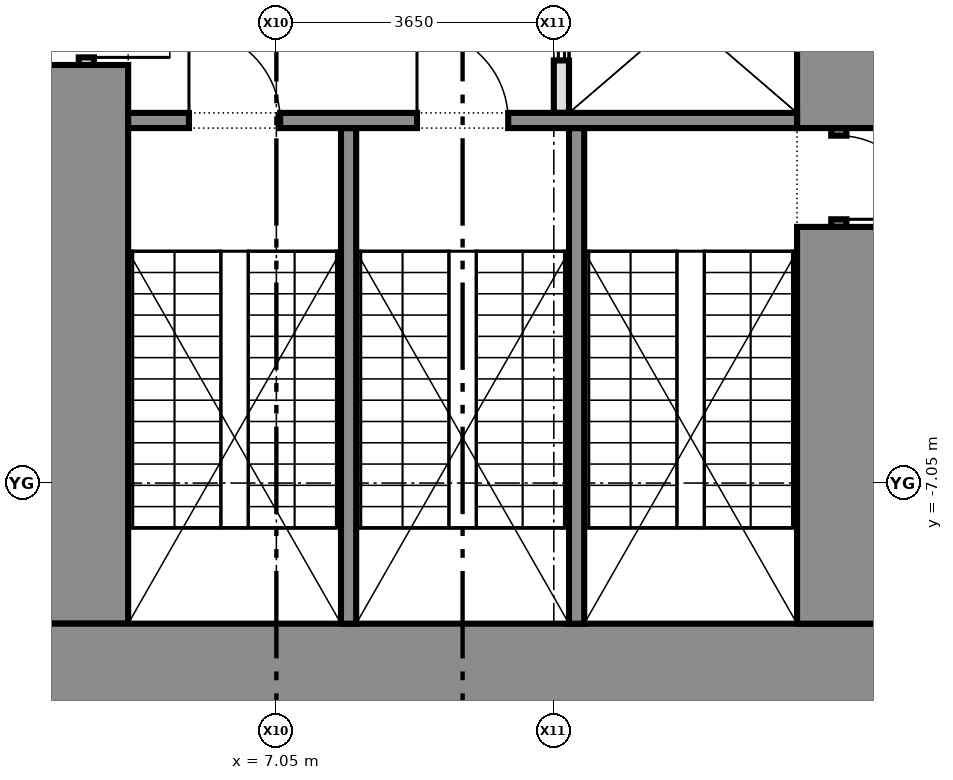
"""IFC4 building model, lengths in metres.
Left out: names, types, materials, properties, quantities, classifications, styles, units other than length and angle.
Written with IfcOpenShell. Run it as: python <this file> out.ifc"""

import sys

from ifc_helpers import new_model, si_unit, direction, frame, frame_2d, origin, place, context, subcontext, project, spatial, rectangle, extrude, element, fill, save


model = new_model("IFC4")
c1 = context("Model", 3, precision=1e-05, world=origin(), true_north=direction((0.0, 1.0)))
c2 = subcontext(c1, "Body", "Model", "MODEL_VIEW")
j1 = project(units=[si_unit("LENGTHUNIT", "METRE"), si_unit("PLANEANGLEUNIT", "RADIAN")], contexts=[c1])
p1 = place(None, origin())
s1 = spatial("IfcSite", under=j1, at=p1, CompositionType="ELEMENT")
p2 = place(p1, origin())
s2 = spatial("IfcBuilding", under=s1, at=p2, CompositionType="ELEMENT")
p3 = place(p2, frame((0.0, 0.0, 40.1)))
s3 = spatial("IfcBuildingStorey", under=s2, at=p3, CompositionType="ELEMENT", Elevation=40.1)
p4 = place(p3, frame((15.0, -9.45, 0.0), z_axis=(0.0, 0.0, 1.0), x_axis=(-1.0, 0.0, 0.0)))
e1 = element("IfcWall", 1, at=p4, inside=s3, PredefinedType="SHEAR", context=c2, shape_type="SweptSolid", body=[
    extrude(rectangle(XDim=11.0, YDim=1.1, at=frame_2d((5.5, 0.0))), origin(), (0.0, 0.0, 1.0), 4.575),
])
p5 = place(p3, frame((14.45, 3.75, 0.0), z_axis=(0.0, 0.0, 1.0), x_axis=(0.0, -1.0, 0.0)))
e2 = element("IfcWall", 2, at=p5, inside=s3, PredefinedType="SHEAR", context=c2, shape_type="SweptSolid", body=[
    extrude(rectangle(XDim=6.13, YDim=1.1, at=frame_2d((3.065, 0.0))), origin(), (0.0, 0.0, 1.0), 4.575),
])
p6 = place(p3, frame((14.45, -2.38, 0.0), z_axis=(0.0, 0.0, 1.0), x_axis=(0.0, -1.0, 0.0)))
e3 = element("IfcWall", 3, at=p6, inside=s3, PredefinedType="SHEAR", context=c2, shape_type="SweptSolid", body=[
    extrude(rectangle(XDim=1.3, YDim=0.2, at=frame_2d((0.65, 0.0))), origin(), (0.0, 0.0, 1.0), 2.4),
])
p7 = place(p6, frame((0.1, 0.0, 0.0)))
e4 = element("IfcOpeningElement", 4, at=p7, cuts=e3, PredefinedType="OPENING", context=c2, shape_type="SweptSolid", body=[
    extrude(rectangle(XDim=1.1, YDim=2.1, at=frame_2d((0.55, 1.05))), frame((0.0, 0.11, 0.0), z_axis=(0.0, -1.0, 0.0), x_axis=(1.0, 0.0, 0.0)), (0.0, 0.0, 1.0), 0.22),
])
p8 = place(p3, frame((14.45, -3.68, 0.0), z_axis=(0.0, 0.0, 1.0), x_axis=(0.0, -1.0, 0.0)))
e5 = element("IfcWall", 5, at=p8, inside=s3, PredefinedType="SHEAR", context=c2, shape_type="SweptSolid", body=[
    extrude(rectangle(XDim=5.22, YDim=1.1, at=frame_2d((2.61, 0.0))), origin(), (0.0, 0.0, 1.0), 4.575),
])
p9 = place(p3, frame((4.55, -0.25, 0.0), z_axis=(0.0, 0.0, 1.0), x_axis=(0.0, -1.0, 0.0)))
e6 = element("IfcWall", 6, at=p9, inside=s3, PredefinedType="PARTITIONING", context=c2, shape_type="SweptSolid", body=[
    extrude(rectangle(XDim=1.3, YDim=0.2, at=frame_2d((0.65, 0.0))), origin(), (0.0, 0.0, 1.0), 2.4),
])
p10 = place(p9, frame((0.1, 0.0, 0.0)))
e7 = element("IfcOpeningElement", 7, at=p10, cuts=e6, PredefinedType="OPENING", context=c2, shape_type="SweptSolid", body=[
    extrude(rectangle(XDim=1.1, YDim=2.1, at=frame_2d((0.55, 1.05))), frame((0.0, 0.11, 0.0), z_axis=(0.0, -1.0, 0.0), x_axis=(1.0, 0.0, 0.0)), (0.0, 0.0, 1.0), 0.22),
])
p11 = place(p3, frame((4.55, -1.55, 0.0), z_axis=(0.0, 0.0, 1.0), x_axis=(0.0, -1.0, 0.0)))
e8 = element("IfcWall", 8, at=p11, inside=s3, PredefinedType="SHEAR", context=c2, shape_type="SweptSolid", body=[
    extrude(rectangle(XDim=7.35, YDim=1.1, at=frame_2d((3.675, 0.0))), origin(), (0.0, 0.0, 1.0), 4.575),
])
p12 = place(p3, frame((10.8, 0.4, 0.0), z_axis=(0.0, 0.0, 1.0), x_axis=(0.0, -1.0, 0.0)))
e9 = element("IfcWall", 9, at=p12, inside=s3, PredefinedType="PARTITIONING", context=c2, shape_type="SweptSolid", body=[
    extrude(rectangle(XDim=2.58, YDim=0.2, at=frame_2d((1.29, 0.0))), origin(), (0.0, 0.0, 1.0), 4.575),
])
p13 = place(p12, frame((0.69, 0.0, 0.0)))
e10 = element("IfcOpeningElement", 10, at=p13, cuts=e9, PredefinedType="OPENING", context=c2, shape_type="SweptSolid", body=[
    extrude(rectangle(XDim=1.2, YDim=2.1, at=frame_2d((0.6, 1.05))), frame((0.0, 0.11, 0.0), z_axis=(0.0, -1.0, 0.0), x_axis=(1.0, 0.0, 0.0)), (0.0, 0.0, 1.0), 0.22),
])
p14 = place(p3, frame((13.9, -2.28, 0.0), z_axis=(0.0, 0.0, 1.0), x_axis=(-1.0, 0.0, 0.0)))
e11 = element("IfcWall", 11, at=p14, inside=s3, PredefinedType="SHEAR", context=c2, shape_type="SweptSolid", body=[
    extrude(rectangle(XDim=8.8, YDim=0.2, at=frame_2d((4.4, 0.0))), origin(), (0.0, 0.0, 1.0), 4.575),
])
p15 = place(p14, frame((3.8, 0.0, 0.0)))
e12 = element("IfcOpeningElement", 12, at=p15, cuts=e11, PredefinedType="OPENING", context=c2, shape_type="SweptSolid", body=[
    extrude(rectangle(XDim=1.2, YDim=2.1, at=frame_2d((0.6, 1.05))), frame((0.0, 0.11, 0.0), z_axis=(0.0, -1.0, 0.0), x_axis=(1.0, 0.0, 0.0)), (0.0, 0.0, 1.0), 0.22),
])
p16 = place(p14, frame((6.8, 0.0, 0.0)))
e13 = element("IfcOpeningElement", 13, at=p16, cuts=e11, PredefinedType="OPENING", context=c2, shape_type="SweptSolid", body=[
    extrude(rectangle(XDim=1.2, YDim=2.1, at=frame_2d((0.6, 1.05))), frame((0.0, 0.11, 0.0), z_axis=(0.0, -1.0, 0.0), x_axis=(1.0, 0.0, 0.0)), (0.0, 0.0, 1.0), 0.22),
])
for number, where, z_axis, x_axis in (
    (14, (11.0, -2.38, 0.0), (0.0, 0.0, 1.0), (0.0, -1.0, 0.0)),
    (15, (8.0, -2.38, 0.0), (0.0, 0.0, 1.0), (0.0, -1.0, 0.0)),
):
    element("IfcWall", number, at=place(p3, frame(where, z_axis=z_axis, x_axis=x_axis)), inside=s3, PredefinedType="SHEAR", context=c2, shape_type="SweptSolid", body=[
        extrude(rectangle(XDim=6.52, YDim=0.2, at=frame_2d((3.26, 0.0))), origin(), (0.0, 0.0, 1.0), 4.575),
    ])
p17 = place(p7, origin())
e16 = element("IfcDoor", 16, at=p17, inside=s3, OperationType="SINGLE_SWING_RIGHT", PredefinedType="DOOR", context=c2, shape_type="SweptSolid", body=[
    extrude(rectangle(XDim=1.1, YDim=2.1, at=frame_2d((0.55, 1.05))), frame((0.0, 0.025, 0.0), z_axis=(0.0, -1.0, 0.0), x_axis=(1.0, 0.0, 0.0)), (0.0, 0.0, 1.0), 0.05),
])
fill(e4, e16)
p18 = place(p10, origin())
e17 = element("IfcDoor", 17, at=p18, inside=s3, OperationType="SINGLE_SWING_RIGHT", PredefinedType="DOOR", context=c2, shape_type="SweptSolid", body=[
    extrude(rectangle(XDim=1.1, YDim=2.1, at=frame_2d((0.55, 1.05))), frame((0.0, 0.025, 0.0), z_axis=(0.0, -1.0, 0.0), x_axis=(1.0, 0.0, 0.0)), (0.0, 0.0, 1.0), 0.05),
])
fill(e7, e17)
p19 = place(p13, origin())
e18 = element("IfcDoor", 18, at=p19, inside=s3, OperationType="DOUBLE_DOOR_SLIDING", PredefinedType="DOOR", context=c2, shape_type="SweptSolid", body=[
    extrude(rectangle(XDim=1.2, YDim=2.1, at=frame_2d((0.6, 1.05))), frame((0.0, 0.025, 0.0), z_axis=(0.0, -1.0, 0.0), x_axis=(1.0, 0.0, 0.0)), (0.0, 0.0, 1.0), 0.05),
])
fill(e10, e18)
p20 = place(p15, frame((1.2, 0.0, 0.0), z_axis=(0.0, 0.0, 1.0), x_axis=(-1.0, 0.0, 0.0)))
e19 = element("IfcDoor", 19, at=p20, inside=s3, OperationType="SINGLE_SWING_LEFT", PredefinedType="DOOR", context=c2, shape_type="SweptSolid", body=[
    extrude(rectangle(XDim=1.2, YDim=2.1, at=frame_2d((0.6, 1.05))), frame((0.0, 0.025, 0.0), z_axis=(0.0, -1.0, 0.0), x_axis=(1.0, 0.0, 0.0)), (0.0, 0.0, 1.0), 0.05),
])
fill(e12, e19)
p21 = place(p16, frame((1.2, 0.0, 0.0), z_axis=(0.0, 0.0, 1.0), x_axis=(-1.0, 0.0, 0.0)))
e20 = element("IfcDoor", 20, at=p21, inside=s3, OperationType="SINGLE_SWING_LEFT", PredefinedType="DOOR", context=c2, shape_type="SweptSolid", body=[
    extrude(rectangle(XDim=1.2, YDim=2.1, at=frame_2d((0.6, 1.05))), frame((0.0, 0.025, 0.0), z_axis=(0.0, -1.0, 0.0), x_axis=(1.0, 0.0, 0.0)), (0.0, 0.0, 1.0), 0.05),
])
fill(e13, e20)
save(model, sys.argv[1])
